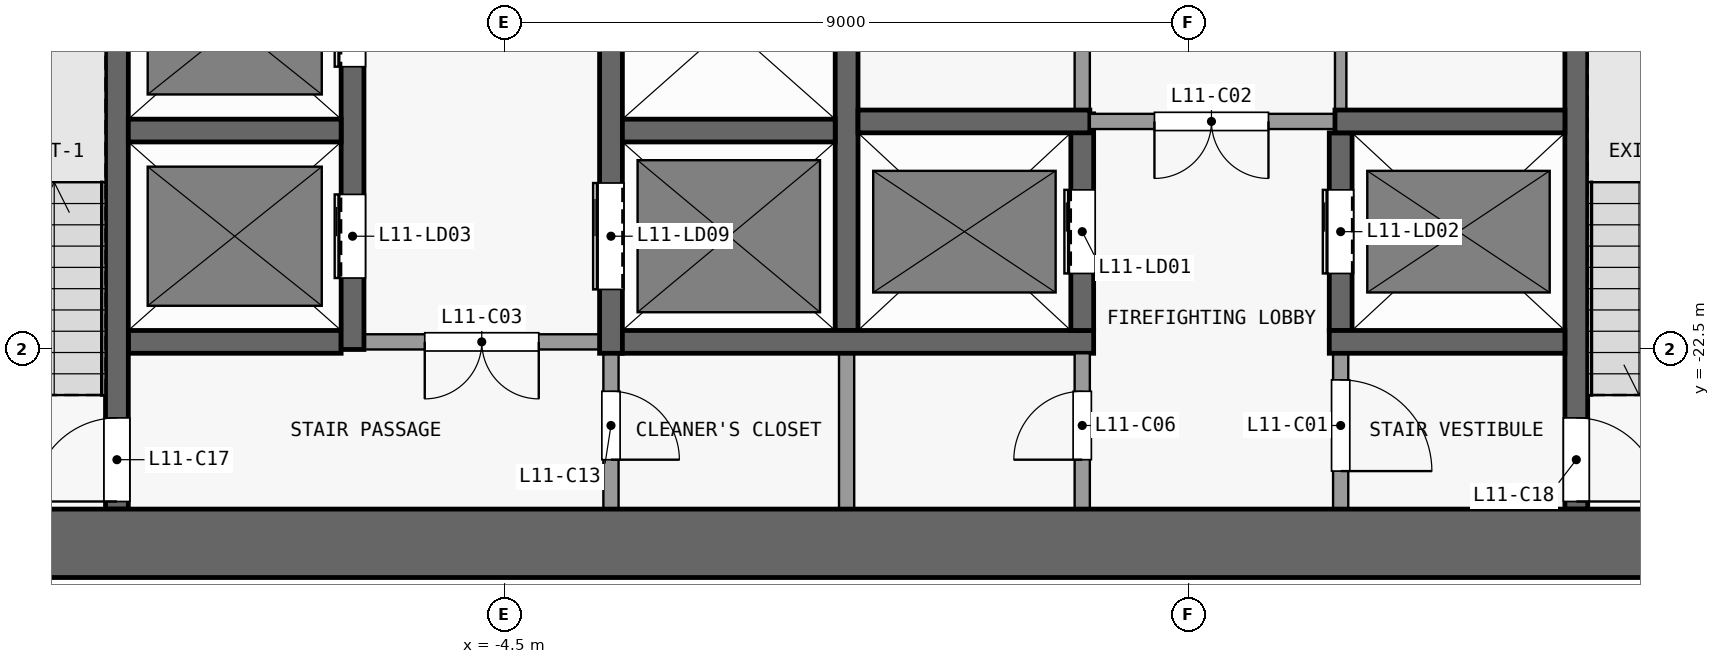
"""IFC4 building model, lengths in metres.
Left out: names, types, materials, properties, quantities, classifications, styles, units other than length and angle.
Written with IfcOpenShell. Run it as: python <this file> out.ifc"""

import sys

from ifc_helpers import new_model, si_unit, direction, frame, frame_2d, origin, place, context, subcontext, project, spatial, rectangle, extrude, element, fill, save


model = new_model("IFC4")
c1 = context("Model", 3, precision=1e-05, world=origin(), true_north=direction((0.0, 1.0)))
c2 = subcontext(c1, "Body", "Model", "MODEL_VIEW")
j1 = project(units=[si_unit("LENGTHUNIT", "METRE"), si_unit("PLANEANGLEUNIT", "RADIAN")], contexts=[c1])
p1 = place(None, origin())
s1 = spatial("IfcSite", under=j1, at=p1, CompositionType="ELEMENT")
p2 = place(p1, origin())
s2 = spatial("IfcBuilding", under=s1, at=p2, CompositionType="ELEMENT")
p3 = place(p2, frame((0.0, 0.0, 50.5)))
s3 = spatial("IfcBuildingStorey", under=s2, at=p3, CompositionType="ELEMENT", Elevation=50.5)
p4 = place(p3, frame((-13.5, -25.05, 0.0), z_axis=(0.0, 0.0, 1.0), x_axis=(1.0, 0.0, 0.0)))
e1 = element("IfcWall", 1, at=p4, inside=s3, PredefinedType="SHEAR", context=c2, shape_type="SweptSolid", body=[
    extrude(rectangle(XDim=27.0, YDim=0.9, at=frame_2d((13.5, 0.0))), origin(), (0.0, 0.0, 1.0), 3.3),
])
p5 = place(p3, frame((-9.45, -22.4, 0.0), z_axis=(0.0, 0.0, 1.0), x_axis=(1.0, 0.0, 0.0)))
e2 = element("IfcWall", 2, at=p5, inside=s3, PredefinedType="SHEAR", context=c2, shape_type="SweptSolid", body=[
    extrude(rectangle(XDim=2.8, YDim=0.3, at=frame_2d((1.4, 0.0))), origin(), (0.0, 0.0, 1.0), 3.3),
])
p6 = place(p3, frame((-3.25, -22.4, 0.0), z_axis=(0.0, 0.0, 1.0), x_axis=(-1.0, 0.0, 0.0)))
e3 = element("IfcWall", 3, at=p6, inside=s3, PredefinedType="PARTITIONING", context=c2, shape_type="SweptSolid", body=[
    extrude(rectangle(XDim=3.1, YDim=0.2, at=frame_2d((1.55, 0.0))), origin(), (0.0, 0.0, 1.0), 3.3),
])
p7 = place(p6, frame((0.8, 0.0, 0.0)))
e4 = element("IfcOpeningElement", 4, at=p7, cuts=e3, PredefinedType="OPENING", context=c2, shape_type="SweptSolid", body=[
    extrude(rectangle(XDim=1.5, YDim=2.1, at=frame_2d((0.75, 1.05))), frame((0.0, 0.11, 0.0), z_axis=(0.0, -1.0, 0.0), x_axis=(1.0, 0.0, 0.0)), (0.0, 0.0, 1.0), 0.22),
])
p8 = place(p3, frame((-2.95, -22.4, 0.0), z_axis=(0.0, 0.0, 1.0), x_axis=(1.0, 0.0, 0.0)))
e5 = element("IfcWall", 5, at=p8, inside=s3, PredefinedType="SHEAR", context=c2, shape_type="SweptSolid", body=[
    extrude(rectangle(XDim=6.2, YDim=0.3, at=frame_2d((3.1, 0.0))), origin(), (0.0, 0.0, 1.0), 3.3),
])
p9 = place(p3, frame((6.35, -22.4, 0.0), z_axis=(0.0, 0.0, 1.0), x_axis=(1.0, 0.0, 0.0)))
e6 = element("IfcWall", 6, at=p9, inside=s3, PredefinedType="SHEAR", context=c2, shape_type="SweptSolid", body=[
    extrude(rectangle(XDim=3.1, YDim=0.3, at=frame_2d((1.55, 0.0))), origin(), (0.0, 0.0, 1.0), 3.3),
])
for number, where, z_axis, x_axis in (
    (7, (-9.45, -19.62, 0.0), (0.0, 0.0, 1.0), (1.0, 0.0, 0.0)),
    (8, (-2.95, -19.62, 0.0), (0.0, 0.0, 1.0), (1.0, 0.0, 0.0)),
):
    element("IfcWall", number, at=place(p3, frame(where, z_axis=z_axis, x_axis=x_axis)), inside=s3, PredefinedType="SHEAR", context=c2, shape_type="SweptSolid", body=[
        extrude(rectangle(XDim=2.8, YDim=0.3, at=frame_2d((1.4, 0.0))), origin(), (0.0, 0.0, 1.0), 3.3),
    ])
p10 = place(p3, frame((0.15, -19.5, 0.0), z_axis=(0.0, 0.0, 1.0), x_axis=(1.0, 0.0, 0.0)))
e9 = element("IfcWall", 9, at=p10, inside=s3, PredefinedType="SHEAR", context=c2, shape_type="SweptSolid", body=[
    extrude(rectangle(XDim=3.05, YDim=0.3, at=frame_2d((1.525, 0.0))), origin(), (0.0, 0.0, 1.0), 3.3),
])
p11 = place(p3, frame((6.575, -19.5, 0.0), z_axis=(0.0, 0.0, 1.0), x_axis=(-1.0, 0.0, 0.0)))
e10 = element("IfcWall", 10, at=p11, inside=s3, PredefinedType="PARTITIONING", context=c2, shape_type="SweptSolid", body=[
    extrude(rectangle(XDim=3.375, YDim=0.2, at=frame_2d((1.688, 0.0))), origin(), (0.0, 0.0, 1.0), 3.3),
])
p12 = place(p11, frame((1.025, 0.0, 0.0)))
e11 = element("IfcOpeningElement", 11, at=p12, cuts=e10, PredefinedType="OPENING", context=c2, shape_type="SweptSolid", body=[
    extrude(rectangle(XDim=1.5, YDim=2.1, at=frame_2d((0.75, 1.05))), frame((0.0, 0.11, 0.0), z_axis=(0.0, -1.0, 0.0), x_axis=(1.0, 0.0, 0.0)), (0.0, 0.0, 1.0), 0.22),
])
p13 = place(p3, frame((6.425, -19.5, 0.0), z_axis=(0.0, 0.0, 1.0), x_axis=(1.0, 0.0, 0.0)))
e12 = element("IfcWall", 12, at=p13, inside=s3, PredefinedType="SHEAR", context=c2, shape_type="SweptSolid", body=[
    extrude(rectangle(XDim=3.025, YDim=0.3, at=frame_2d((1.512, 0.0))), origin(), (0.0, 0.0, 1.0), 3.3),
])
p14 = place(p3, frame((-9.6, -24.6, 0.0), z_axis=(0.0, 0.0, 1.0), x_axis=(0.0, 1.0, 0.0)))
e13 = element("IfcWall", 13, at=p14, inside=s3, PredefinedType="SHEAR", context=c2, shape_type="SweptSolid", body=[
    extrude(rectangle(XDim=7.7, YDim=0.3, at=frame_2d((3.85, 0.0))), origin(), (0.0, 0.0, 1.0), 3.3),
])
p15 = place(p14, frame((0.1, 0.0, 0.0)))
e14 = element("IfcOpeningElement", 14, at=p15, cuts=e13, PredefinedType="OPENING", context=c2, shape_type="SweptSolid", body=[
    extrude(rectangle(XDim=1.1, YDim=2.1, at=frame_2d((0.55, 1.05))), frame((0.0, 0.16, 0.0), z_axis=(0.0, -1.0, 0.0), x_axis=(1.0, 0.0, 0.0)), (0.0, 0.0, 1.0), 0.32),
])
p16 = place(p3, frame((-6.5, -22.5, 0.0), z_axis=(0.0, 0.0, 1.0), x_axis=(0.0, 1.0, 0.0)))
e15 = element("IfcWall", 15, at=p16, inside=s3, PredefinedType="SHEAR", context=c2, shape_type="SweptSolid", body=[
    extrude(rectangle(XDim=14.0, YDim=0.3, at=frame_2d((7.0, 0.0))), origin(), (0.0, 0.0, 1.0), 3.3),
])
p17 = place(p16, frame((0.94, 0.0, 0.0)))
e16 = element("IfcOpeningElement", 16, at=p17, cuts=e15, PredefinedType="OPENING", context=c2, shape_type="SweptSolid", body=[
    extrude(rectangle(XDim=1.1, YDim=2.1, at=frame_2d((0.55, 1.05))), frame((0.0, 0.16, 0.0), z_axis=(0.0, -1.0, 0.0), x_axis=(1.0, 0.0, 0.0)), (0.0, 0.0, 1.0), 0.32),
])
p18 = place(p16, frame((3.72, 0.0, 0.0)))
e17 = element("IfcOpeningElement", 17, at=p18, cuts=e15, PredefinedType="OPENING", context=c2, shape_type="SweptSolid", body=[
    extrude(rectangle(XDim=1.1, YDim=2.1, at=frame_2d((0.55, 1.05))), frame((0.0, 0.16, 0.0), z_axis=(0.0, -1.0, 0.0), x_axis=(1.0, 0.0, 0.0)), (0.0, 0.0, 1.0), 0.32),
])
p19 = place(p16, frame((6.5, 0.0, 0.0)))
e18 = element("IfcOpeningElement", 18, at=p19, cuts=e15, PredefinedType="OPENING", context=c2, shape_type="SweptSolid", body=[
    extrude(rectangle(XDim=1.1, YDim=2.1, at=frame_2d((0.55, 1.05))), frame((0.0, 0.16, 0.0), z_axis=(0.0, -1.0, 0.0), x_axis=(1.0, 0.0, 0.0)), (0.0, 0.0, 1.0), 0.32),
])
p20 = place(p16, frame((9.28, 0.0, 0.0)))
e19 = element("IfcOpeningElement", 19, at=p20, cuts=e15, PredefinedType="OPENING", context=c2, shape_type="SweptSolid", body=[
    extrude(rectangle(XDim=1.1, YDim=2.1, at=frame_2d((0.55, 1.05))), frame((0.0, 0.16, 0.0), z_axis=(0.0, -1.0, 0.0), x_axis=(1.0, 0.0, 0.0)), (0.0, 0.0, 1.0), 0.32),
])
p21 = place(p16, frame((12.06, 0.0, 0.0)))
e20 = element("IfcOpeningElement", 20, at=p21, cuts=e15, PredefinedType="OPENING", context=c2, shape_type="SweptSolid", body=[
    extrude(rectangle(XDim=1.1, YDim=2.1, at=frame_2d((0.55, 1.05))), frame((0.0, 0.16, 0.0), z_axis=(0.0, -1.0, 0.0), x_axis=(1.0, 0.0, 0.0)), (0.0, 0.0, 1.0), 0.32),
])
p22 = place(p3, frame((-3.1, -22.55, 0.0), z_axis=(0.0, 0.0, 1.0), x_axis=(0.0, -1.0, 0.0)))
e21 = element("IfcWall", 21, at=p22, inside=s3, PredefinedType="PARTITIONING", context=c2, shape_type="SweptSolid", body=[
    extrude(rectangle(XDim=2.05, YDim=0.2, at=frame_2d((1.025, 0.0))), origin(), (0.0, 0.0, 1.0), 3.3),
])
p23 = place(p22, frame((0.5, 0.0, 0.0)))
e22 = element("IfcOpeningElement", 22, at=p23, cuts=e21, PredefinedType="OPENING", context=c2, shape_type="SweptSolid", body=[
    extrude(rectangle(XDim=0.9, YDim=2.1, at=frame_2d((0.45, 1.05))), frame((0.0, 0.11, 0.0), z_axis=(0.0, -1.0, 0.0), x_axis=(1.0, 0.0, 0.0)), (0.0, 0.0, 1.0), 0.22),
])
p24 = place(p3, frame((-3.1, -22.55, 0.0), z_axis=(0.0, 0.0, 1.0), x_axis=(0.0, 1.0, 0.0)))
e23 = element("IfcWall", 23, at=p24, inside=s3, PredefinedType="SHEAR", context=c2, shape_type="SweptSolid", body=[
    extrude(rectangle(XDim=14.05, YDim=0.3, at=frame_2d((7.025, 0.0))), origin(), (0.0, 0.0, 1.0), 3.3),
])
p25 = place(p24, frame((12.11, 0.0, 0.0)))
e24 = element("IfcOpeningElement", 24, at=p25, cuts=e23, PredefinedType="OPENING", context=c2, shape_type="SweptSolid", body=[
    extrude(rectangle(XDim=1.1, YDim=2.1, at=frame_2d((0.55, 1.05))), frame((0.0, 0.16, 0.0), z_axis=(0.0, -1.0, 0.0), x_axis=(1.0, 0.0, 0.0)), (0.0, 0.0, 1.0), 0.32),
])
p26 = place(p24, frame((0.84, 0.0, 0.0)))
e25 = element("IfcOpeningElement", 25, at=p26, cuts=e23, PredefinedType="OPENING", context=c2, shape_type="SweptSolid", body=[
    extrude(rectangle(XDim=1.4, YDim=2.1, at=frame_2d((0.7, 1.05))), frame((0.0, 0.16, 0.0), z_axis=(0.0, -1.0, 0.0), x_axis=(1.0, 0.0, 0.0)), (0.0, 0.0, 1.0), 0.32),
])
p27 = place(p3, frame((0.0, -24.6, 0.0), z_axis=(0.0, 0.0, 1.0), x_axis=(0.0, 1.0, 0.0)))
e26 = element("IfcWall", 26, at=p27, inside=s3, PredefinedType="PARTITIONING", context=c2, shape_type="SweptSolid", body=[
    extrude(rectangle(XDim=2.05, YDim=0.2, at=frame_2d((1.025, 0.0))), origin(), (0.0, 0.0, 1.0), 3.3),
])
p28 = place(p3, frame((0.0, -22.25, 0.0), z_axis=(0.0, 0.0, 1.0), x_axis=(0.0, 1.0, 0.0)))
e27 = element("IfcWall", 27, at=p28, inside=s3, PredefinedType="SHEAR", context=c2, shape_type="SweptSolid", body=[
    extrude(rectangle(XDim=13.75, YDim=0.3, at=frame_2d((6.875, 0.0))), origin(), (0.0, 0.0, 1.0), 3.3),
])
p29 = place(p3, frame((3.1, -24.6, 0.0), z_axis=(0.0, 0.0, 1.0), x_axis=(0.0, 1.0, 0.0)))
e28 = element("IfcWall", 28, at=p29, inside=s3, PredefinedType="PARTITIONING", context=c2, shape_type="SweptSolid", body=[
    extrude(rectangle(XDim=2.05, YDim=0.2, at=frame_2d((1.025, 0.0))), origin(), (0.0, 0.0, 1.0), 3.3),
])
p30 = place(p29, frame((0.65, 0.0, 0.0)))
e29 = element("IfcOpeningElement", 29, at=p30, cuts=e28, PredefinedType="OPENING", context=c2, shape_type="SweptSolid", body=[
    extrude(rectangle(XDim=0.9, YDim=2.1, at=frame_2d((0.45, 1.05))), frame((0.0, 0.11, 0.0), z_axis=(0.0, -1.0, 0.0), x_axis=(1.0, 0.0, 0.0)), (0.0, 0.0, 1.0), 0.22),
])
p31 = place(p3, frame((3.1, -22.25, 0.0), z_axis=(0.0, 0.0, 1.0), x_axis=(0.0, 1.0, 0.0)))
e30 = element("IfcWall", 30, at=p31, inside=s3, PredefinedType="SHEAR", context=c2, shape_type="SweptSolid", body=[
    extrude(rectangle(XDim=2.85, YDim=0.3, at=frame_2d((1.425, 0.0))), origin(), (0.0, 0.0, 1.0), 3.3),
])
p32 = place(p31, frame((0.75, 0.0, 0.0)))
e31 = element("IfcOpeningElement", 31, at=p32, cuts=e30, PredefinedType="OPENING", context=c2, shape_type="SweptSolid", body=[
    extrude(rectangle(XDim=1.1, YDim=2.1, at=frame_2d((0.55, 1.05))), frame((0.0, 0.16, 0.0), z_axis=(0.0, -1.0, 0.0), x_axis=(1.0, 0.0, 0.0)), (0.0, 0.0, 1.0), 0.32),
])
p33 = place(p3, frame((3.1, -19.6, 0.0), z_axis=(0.0, 0.0, 1.0), x_axis=(0.0, 1.0, 0.0)))
e32 = element("IfcWall", 32, at=p33, inside=s3, PredefinedType="PARTITIONING", context=c2, shape_type="SweptSolid", body=[
    extrude(rectangle(XDim=11.1, YDim=0.2, at=frame_2d((5.55, 0.0))), origin(), (0.0, 0.0, 1.0), 3.3),
])
p34 = place(p33, frame((2.25, 0.0, 0.0)))
e33 = element("IfcOpeningElement", 33, at=p34, cuts=e32, PredefinedType="OPENING", context=c2, shape_type="SweptSolid", body=[
    extrude(rectangle(XDim=1.2, YDim=2.1, at=frame_2d((0.6, 1.05))), frame((0.0, 0.11, 0.0), z_axis=(0.0, -1.0, 0.0), x_axis=(1.0, 0.0, 0.0)), (0.0, 0.0, 1.0), 0.22),
])
p35 = place(p33, frame((7.75, 0.0, 0.0)))
e34 = element("IfcOpeningElement", 34, at=p35, cuts=e32, PredefinedType="OPENING", context=c2, shape_type="SweptSolid", body=[
    extrude(rectangle(XDim=1.2, YDim=2.1, at=frame_2d((0.6, 1.05))), frame((0.0, 0.11, 0.0), z_axis=(0.0, -1.0, 0.0), x_axis=(1.0, 0.0, 0.0)), (0.0, 0.0, 1.0), 0.22),
])
p36 = place(p3, frame((6.5, -22.55, 0.0), z_axis=(0.0, 0.0, 1.0), x_axis=(0.0, -1.0, 0.0)))
e35 = element("IfcWall", 35, at=p36, inside=s3, PredefinedType="PARTITIONING", context=c2, shape_type="SweptSolid", body=[
    extrude(rectangle(XDim=2.05, YDim=0.2, at=frame_2d((1.025, 0.0))), origin(), (0.0, 0.0, 1.0), 3.3),
])
p37 = place(p36, frame((0.35, 0.0, 0.0)))
e36 = element("IfcOpeningElement", 36, at=p37, cuts=e35, PredefinedType="OPENING", context=c2, shape_type="SweptSolid", body=[
    extrude(rectangle(XDim=1.2, YDim=2.1, at=frame_2d((0.6, 1.05))), frame((0.0, 0.11, 0.0), z_axis=(0.0, -1.0, 0.0), x_axis=(1.0, 0.0, 0.0)), (0.0, 0.0, 1.0), 0.22),
])
p38 = place(p3, frame((6.5, -22.25, 0.0), z_axis=(0.0, 0.0, 1.0), x_axis=(0.0, 1.0, 0.0)))
e37 = element("IfcWall", 37, at=p38, inside=s3, PredefinedType="SHEAR", context=c2, shape_type="SweptSolid", body=[
    extrude(rectangle(XDim=2.6, YDim=0.3, at=frame_2d((1.3, 0.0))), origin(), (0.0, 0.0, 1.0), 3.3),
])
p39 = place(p38, frame((0.75, 0.0, 0.0)))
e38 = element("IfcOpeningElement", 38, at=p39, cuts=e37, PredefinedType="OPENING", context=c2, shape_type="SweptSolid", body=[
    extrude(rectangle(XDim=1.1, YDim=2.1, at=frame_2d((0.55, 1.05))), frame((0.0, 0.16, 0.0), z_axis=(0.0, -1.0, 0.0), x_axis=(1.0, 0.0, 0.0)), (0.0, 0.0, 1.0), 0.32),
])
p40 = place(p3, frame((6.5, -8.5, 0.0), z_axis=(0.0, 0.0, 1.0), x_axis=(0.0, -1.0, 0.0)))
e39 = element("IfcWall", 39, at=p40, inside=s3, PredefinedType="PARTITIONING", context=c2, shape_type="SweptSolid", body=[
    extrude(rectangle(XDim=10.85, YDim=0.15, at=frame_2d((5.425, 0.0))), origin(), (0.0, 0.0, 1.0), 3.3),
])
p41 = place(p40, frame((4.9, 0.0, 0.0)))
e40 = element("IfcOpeningElement", 40, at=p41, cuts=e39, PredefinedType="OPENING", context=c2, shape_type="SweptSolid", body=[
    extrude(rectangle(XDim=1.2, YDim=2.1, at=frame_2d((0.6, 1.05))), frame((0.0, 0.085, 0.0), z_axis=(0.0, -1.0, 0.0), x_axis=(1.0, 0.0, 0.0)), (0.0, 0.0, 1.0), 0.17),
])
p42 = place(p3, frame((9.6, -16.9, 0.0), z_axis=(0.0, 0.0, 1.0), x_axis=(0.0, -1.0, 0.0)))
e41 = element("IfcWall", 41, at=p42, inside=s3, PredefinedType="SHEAR", context=c2, shape_type="SweptSolid", body=[
    extrude(rectangle(XDim=7.7, YDim=0.3, at=frame_2d((3.85, 0.0))), origin(), (0.0, 0.0, 1.0), 3.3),
])
p43 = place(p42, frame((6.5, 0.0, 0.0)))
e42 = element("IfcOpeningElement", 42, at=p43, cuts=e41, PredefinedType="OPENING", context=c2, shape_type="SweptSolid", body=[
    extrude(rectangle(XDim=1.1, YDim=2.1, at=frame_2d((0.55, 1.05))), frame((0.0, 0.16, 0.0), z_axis=(0.0, -1.0, 0.0), x_axis=(1.0, 0.0, 0.0)), (0.0, 0.0, 1.0), 0.32),
])
p44 = place(p32, origin())
e43 = element("IfcDoor", 43, at=p44, inside=s3, OperationType="DOUBLE_DOOR_SLIDING", PredefinedType="DOOR", context=c2, shape_type="SweptSolid", body=[
    extrude(rectangle(XDim=1.1, YDim=2.1, at=frame_2d((0.55, 1.05))), frame((0.0, 0.025, 0.0), z_axis=(0.0, -1.0, 0.0), x_axis=(1.0, 0.0, 0.0)), (0.0, 0.0, 1.0), 0.05),
])
fill(e31, e43)
p45 = place(p39, origin())
e44 = element("IfcDoor", 44, at=p45, inside=s3, OperationType="DOUBLE_DOOR_SLIDING", PredefinedType="DOOR", context=c2, shape_type="SweptSolid", body=[
    extrude(rectangle(XDim=1.1, YDim=2.1, at=frame_2d((0.55, 1.05))), frame((0.0, 0.025, 0.0), z_axis=(0.0, -1.0, 0.0), x_axis=(1.0, 0.0, 0.0)), (0.0, 0.0, 1.0), 0.05),
])
fill(e38, e44)
p46 = place(p17, origin())
e45 = element("IfcDoor", 45, at=p46, inside=s3, OperationType="DOUBLE_DOOR_SLIDING", PredefinedType="DOOR", context=c2, shape_type="SweptSolid", body=[
    extrude(rectangle(XDim=1.1, YDim=2.1, at=frame_2d((0.55, 1.05))), frame((0.0, 0.025, 0.0), z_axis=(0.0, -1.0, 0.0), x_axis=(1.0, 0.0, 0.0)), (0.0, 0.0, 1.0), 0.05),
])
fill(e16, e45)
p47 = place(p18, origin())
e46 = element("IfcDoor", 46, at=p47, inside=s3, OperationType="DOUBLE_DOOR_SLIDING", PredefinedType="DOOR", context=c2, shape_type="SweptSolid", body=[
    extrude(rectangle(XDim=1.1, YDim=2.1, at=frame_2d((0.55, 1.05))), frame((0.0, 0.025, 0.0), z_axis=(0.0, -1.0, 0.0), x_axis=(1.0, 0.0, 0.0)), (0.0, 0.0, 1.0), 0.05),
])
fill(e17, e46)
p48 = place(p26, origin())
e47 = element("IfcDoor", 47, at=p48, inside=s3, OperationType="DOUBLE_DOOR_SLIDING", PredefinedType="DOOR", context=c2, shape_type="SweptSolid", body=[
    extrude(rectangle(XDim=1.4, YDim=2.1, at=frame_2d((0.7, 1.05))), frame((0.0, 0.025, 0.0), z_axis=(0.0, -1.0, 0.0), x_axis=(1.0, 0.0, 0.0)), (0.0, 0.0, 1.0), 0.05),
])
fill(e25, e47)
p49 = place(p37, origin())
e48 = element("IfcDoor", 48, at=p49, inside=s3, OperationType="SINGLE_SWING_RIGHT", PredefinedType="DOOR", context=c2, shape_type="SweptSolid", body=[
    extrude(rectangle(XDim=1.2, YDim=2.1, at=frame_2d((0.6, 1.05))), frame((0.0, 0.025, 0.0), z_axis=(0.0, -1.0, 0.0), x_axis=(1.0, 0.0, 0.0)), (0.0, 0.0, 1.0), 0.05),
])
fill(e36, e48)
p50 = place(p12, origin())
e49 = element("IfcDoor", 49, at=p50, inside=s3, OperationType="DOUBLE_DOOR_SINGLE_SWING", PredefinedType="DOOR", context=c2, shape_type="SweptSolid", body=[
    extrude(rectangle(XDim=1.5, YDim=2.1, at=frame_2d((0.75, 1.05))), frame((0.0, 0.025, 0.0), z_axis=(0.0, -1.0, 0.0), x_axis=(1.0, 0.0, 0.0)), (0.0, 0.0, 1.0), 0.05),
])
fill(e11, e49)
p51 = place(p7, origin())
e50 = element("IfcDoor", 50, at=p51, inside=s3, OperationType="DOUBLE_DOOR_SINGLE_SWING", PredefinedType="DOOR", context=c2, shape_type="SweptSolid", body=[
    extrude(rectangle(XDim=1.5, YDim=2.1, at=frame_2d((0.75, 1.05))), frame((0.0, 0.025, 0.0), z_axis=(0.0, -1.0, 0.0), x_axis=(1.0, 0.0, 0.0)), (0.0, 0.0, 1.0), 0.05),
])
fill(e4, e50)
p52 = place(p30, origin())
e51 = element("IfcDoor", 51, at=p52, inside=s3, OperationType="SINGLE_SWING_LEFT", PredefinedType="DOOR", context=c2, shape_type="SweptSolid", body=[
    extrude(rectangle(XDim=0.9, YDim=2.1, at=frame_2d((0.45, 1.05))), frame((0.0, 0.025, 0.0), z_axis=(0.0, -1.0, 0.0), x_axis=(1.0, 0.0, 0.0)), (0.0, 0.0, 1.0), 0.05),
])
fill(e29, e51)
p53 = place(p23, origin())
e52 = element("IfcDoor", 52, at=p53, inside=s3, OperationType="SINGLE_SWING_RIGHT", PredefinedType="DOOR", context=c2, shape_type="SweptSolid", body=[
    extrude(rectangle(XDim=0.9, YDim=2.1, at=frame_2d((0.45, 1.05))), frame((0.0, 0.025, 0.0), z_axis=(0.0, -1.0, 0.0), x_axis=(1.0, 0.0, 0.0)), (0.0, 0.0, 1.0), 0.05),
])
fill(e22, e52)
p54 = place(p15, origin())
e53 = element("IfcDoor", 53, at=p54, inside=s3, OperationType="SINGLE_SWING_LEFT", PredefinedType="DOOR", context=c2, shape_type="SweptSolid", body=[
    extrude(rectangle(XDim=1.1, YDim=2.1, at=frame_2d((0.55, 1.05))), frame((0.0, 0.025, 0.0), z_axis=(0.0, -1.0, 0.0), x_axis=(1.0, 0.0, 0.0)), (0.0, 0.0, 1.0), 0.05),
])
fill(e14, e53)
p55 = place(p43, origin())
e54 = element("IfcDoor", 54, at=p55, inside=s3, OperationType="SINGLE_SWING_RIGHT", PredefinedType="DOOR", context=c2, shape_type="SweptSolid", body=[
    extrude(rectangle(XDim=1.1, YDim=2.1, at=frame_2d((0.55, 1.05))), frame((0.0, 0.025, 0.0), z_axis=(0.0, -1.0, 0.0), x_axis=(1.0, 0.0, 0.0)), (0.0, 0.0, 1.0), 0.05),
])
fill(e42, e54)
save(model, sys.argv[1])
